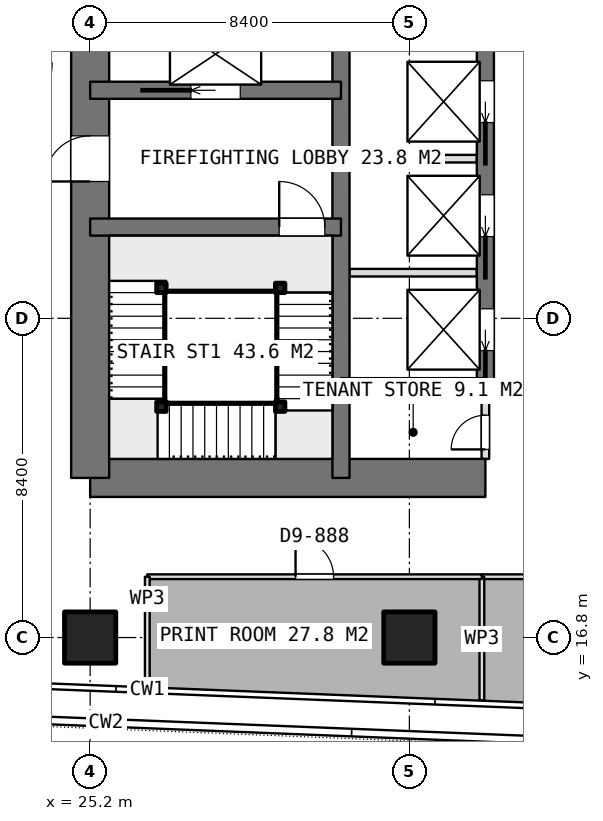
"""IFC4 building model, lengths in metres.
Left out: names, types, materials, properties, quantities, classifications, styles, units other than length and angle.
Written with IfcOpenShell. Run it as: python <this file> out.ifc"""

import sys

from ifc_helpers import new_model, si_unit, direction, frame, frame_2d, origin, origin_2d, place, context, subcontext, project, spatial, rectangle, extrude, element, fill, save


model = new_model("IFC4")
c1 = context("Model", 3, precision=1e-05, world=origin(), true_north=direction((0.0, 1.0)))
c2 = subcontext(c1, "Body", "Model", "MODEL_VIEW")
j1 = project(units=[si_unit("LENGTHUNIT", "METRE"), si_unit("PLANEANGLEUNIT", "RADIAN")], contexts=[c1])
p1 = place(None, origin())
s1 = spatial("IfcSite", under=j1, at=p1, CompositionType="ELEMENT")
p2 = place(p1, origin())
s2 = spatial("IfcBuilding", under=s1, at=p2, CompositionType="ELEMENT")
p3 = place(p2, frame((0.0, 0.0, 225.2)))
s3 = spatial("IfcBuildingStorey", under=s2, at=p3, CompositionType="ELEMENT", Elevation=225.2)
p4 = place(p3, frame((25.2, 21.0, 0.0), z_axis=(0.0, 0.0, 1.0), x_axis=(1.0, 0.0, 0.0)))
e1 = element("IfcWall", 1, at=p4, inside=s3, PredefinedType="SHEAR", context=c2, shape_type="SweptSolid", body=[
    extrude(rectangle(XDim=10.4, YDim=1.0, at=frame_2d((5.2, 0.0))), origin(), (0.0, 0.0, 1.0), 3.75),
])
p5 = place(p3, frame((25.2, 21.0, 0.0), z_axis=(0.0, 0.0, 1.0), x_axis=(0.0, 1.0, 0.0)))
e2 = element("IfcWall", 2, at=p5, inside=s3, PredefinedType="SHEAR", context=c2, shape_type="SweptSolid", body=[
    extrude(rectangle(XDim=25.2, YDim=1.0, at=frame_2d((12.6, 0.0))), origin(), (0.0, 0.0, 1.0), 3.75),
])
p6 = place(p5, frame((7.8, 0.0, 0.0)))
e3 = element("IfcOpeningElement", 3, at=p6, cuts=e2, PredefinedType="OPENING", context=c2, shape_type="SweptSolid", body=[
    extrude(rectangle(XDim=1.2, YDim=2.1, at=frame_2d((0.6, 1.05))), frame((0.0, 0.51, 0.0), z_axis=(0.0, -1.0, 0.0), x_axis=(1.0, 0.0, 0.0)), (0.0, 0.0, 1.0), 1.02),
])
p7 = place(p5, frame((14.25, 0.0, 0.0)))
e4 = element("IfcOpeningElement", 4, at=p7, cuts=e2, PredefinedType="OPENING", context=c2, shape_type="SweptSolid", body=[
    extrude(rectangle(XDim=0.9, YDim=2.1, at=frame_2d((0.45, 1.05))), frame((0.0, 0.51, 0.0), z_axis=(0.0, -1.0, 0.0), x_axis=(1.0, 0.0, 0.0)), (0.0, 0.0, 1.0), 1.02),
])
p8 = place(p5, frame((16.85, 0.0, 0.0)))
e5 = element("IfcOpeningElement", 5, at=p8, cuts=e2, PredefinedType="OPENING", context=c2, shape_type="SweptSolid", body=[
    extrude(rectangle(XDim=0.9, YDim=2.1, at=frame_2d((0.45, 1.05))), frame((0.0, 0.51, 0.0), z_axis=(0.0, -1.0, 0.0), x_axis=(1.0, 0.0, 0.0)), (0.0, 0.0, 1.0), 1.02),
])
p9 = place(p5, frame((19.025, 0.0, 0.0)))
e6 = element("IfcOpeningElement", 6, at=p9, cuts=e2, PredefinedType="OPENING", context=c2, shape_type="SweptSolid", body=[
    extrude(rectangle(XDim=1.2, YDim=2.1, at=frame_2d((0.6, 1.05))), frame((0.0, 0.51, 0.0), z_axis=(0.0, -1.0, 0.0), x_axis=(1.0, 0.0, 0.0)), (0.0, 0.0, 1.0), 1.02),
])
p10 = place(p3, frame((31.8, 21.0, 0.0), z_axis=(0.0, 0.0, 1.0), x_axis=(0.0, 1.0, 0.0)))
e7 = element("IfcWall", 7, at=p10, inside=s3, PredefinedType="SHEAR", context=c2, shape_type="SweptSolid", body=[
    extrude(rectangle(XDim=25.2, YDim=0.45, at=frame_2d((12.6, 0.0))), origin(), (0.0, 0.0, 1.0), 3.75),
])
p11 = place(p3, frame((35.6, 23.4, 0.0), z_axis=(0.0, 0.0, 1.0), x_axis=(0.0, 1.0, 0.0)))
e8 = element("IfcWall", 8, at=p11, inside=s3, PredefinedType="SHEAR", context=c2, shape_type="SweptSolid", body=[
    extrude(rectangle(XDim=18.0, YDim=0.45, at=frame_2d((9.0, 0.0))), origin(), (0.0, 0.0, 1.0), 3.75),
])
p12 = place(p11, frame((0.95, 0.0, 0.0)))
e9 = element("IfcOpeningElement", 9, at=p12, cuts=e8, PredefinedType="OPENING", context=c2, shape_type="SweptSolid", body=[
    extrude(rectangle(XDim=1.1, YDim=2.1, at=frame_2d((0.55, 1.05))), frame((0.0, 0.235, 0.0), z_axis=(0.0, -1.0, 0.0), x_axis=(1.0, 0.0, 0.0)), (0.0, 0.0, 1.0), 0.47),
])
p13 = place(p11, frame((3.95, 0.0, 0.0)))
e10 = element("IfcOpeningElement", 10, at=p13, cuts=e8, PredefinedType="OPENING", context=c2, shape_type="SweptSolid", body=[
    extrude(rectangle(XDim=1.1, YDim=2.1, at=frame_2d((0.55, 1.05))), frame((0.0, 0.235, 0.0), z_axis=(0.0, -1.0, 0.0), x_axis=(1.0, 0.0, 0.0)), (0.0, 0.0, 1.0), 0.47),
])
p14 = place(p11, frame((6.95, 0.0, 0.0)))
e11 = element("IfcOpeningElement", 11, at=p14, cuts=e8, PredefinedType="OPENING", context=c2, shape_type="SweptSolid", body=[
    extrude(rectangle(XDim=1.1, YDim=2.1, at=frame_2d((0.55, 1.05))), frame((0.0, 0.235, 0.0), z_axis=(0.0, -1.0, 0.0), x_axis=(1.0, 0.0, 0.0)), (0.0, 0.0, 1.0), 0.47),
])
p15 = place(p11, frame((9.95, 0.0, 0.0)))
e12 = element("IfcOpeningElement", 12, at=p15, cuts=e8, PredefinedType="OPENING", context=c2, shape_type="SweptSolid", body=[
    extrude(rectangle(XDim=1.1, YDim=2.1, at=frame_2d((0.55, 1.05))), frame((0.0, 0.235, 0.0), z_axis=(0.0, -1.0, 0.0), x_axis=(1.0, 0.0, 0.0)), (0.0, 0.0, 1.0), 0.47),
])
p16 = place(p11, frame((12.95, 0.0, 0.0)))
e13 = element("IfcOpeningElement", 13, at=p16, cuts=e8, PredefinedType="OPENING", context=c2, shape_type="SweptSolid", body=[
    extrude(rectangle(XDim=1.1, YDim=2.1, at=frame_2d((0.55, 1.05))), frame((0.0, 0.235, 0.0), z_axis=(0.0, -1.0, 0.0), x_axis=(1.0, 0.0, 0.0)), (0.0, 0.0, 1.0), 0.47),
])
p17 = place(p11, frame((15.95, 0.0, 0.0)))
e14 = element("IfcOpeningElement", 14, at=p17, cuts=e8, PredefinedType="OPENING", context=c2, shape_type="SweptSolid", body=[
    extrude(rectangle(XDim=1.1, YDim=2.1, at=frame_2d((0.55, 1.05))), frame((0.0, 0.235, 0.0), z_axis=(0.0, -1.0, 0.0), x_axis=(1.0, 0.0, 0.0)), (0.0, 0.0, 1.0), 0.47),
])
p18 = place(p3, frame((31.8, 23.4, 0.0), z_axis=(0.0, 0.0, 1.0), x_axis=(1.0, 0.0, 0.0)))
e15 = element("IfcWall", 15, at=p18, inside=s3, PredefinedType="SHEAR", context=c2, shape_type="SweptSolid", body=[
    extrude(rectangle(XDim=3.8, YDim=0.45, at=frame_2d((1.9, 0.0))), origin(), (0.0, 0.0, 1.0), 3.75),
])
p19 = place(p3, frame((25.2, 27.6, 0.0), z_axis=(0.0, 0.0, 1.0), x_axis=(1.0, 0.0, 0.0)))
e16 = element("IfcWall", 16, at=p19, inside=s3, PredefinedType="SHEAR", context=c2, shape_type="SweptSolid", body=[
    extrude(rectangle(XDim=6.6, YDim=0.45, at=frame_2d((3.3, 0.0))), origin(), (0.0, 0.0, 1.0), 3.75),
])
p20 = place(p19, frame((4.975, 0.0, 0.0)))
e17 = element("IfcOpeningElement", 17, at=p20, cuts=e16, PredefinedType="OPENING", context=c2, shape_type="SweptSolid", body=[
    extrude(rectangle(XDim=1.2, YDim=2.1, at=frame_2d((0.6, 1.05))), frame((0.0, 0.235, 0.0), z_axis=(0.0, -1.0, 0.0), x_axis=(1.0, 0.0, 0.0)), (0.0, 0.0, 1.0), 0.47),
])
p21 = place(p3, frame((25.2, 31.2, 0.0), z_axis=(0.0, 0.0, 1.0), x_axis=(1.0, 0.0, 0.0)))
e18 = element("IfcWall", 18, at=p21, inside=s3, PredefinedType="SHEAR", context=c2, shape_type="SweptSolid", body=[
    extrude(rectangle(XDim=6.6, YDim=0.45, at=frame_2d((3.3, 0.0))), origin(), (0.0, 0.0, 1.0), 3.75),
])
p22 = place(p21, frame((2.65, 0.0, 0.0)))
e19 = element("IfcOpeningElement", 19, at=p22, cuts=e18, PredefinedType="OPENING", context=c2, shape_type="SweptSolid", body=[
    extrude(rectangle(XDim=1.3, YDim=2.1, at=frame_2d((0.65, 1.05))), frame((0.0, 0.235, 0.0), z_axis=(0.0, -1.0, 0.0), x_axis=(1.0, 0.0, 0.0)), (0.0, 0.0, 1.0), 0.47),
])
for number, where, z_axis, x_axis in (
    (20, (25.2, 16.8, 0.0), (0.0, 0.0, 1.0), (1.0, 0.0, 0.0)),
    (21, (33.6, 16.8, 0.0), (0.0, 0.0, 1.0), (1.0, 0.0, 0.0)),
):
    element("IfcColumn", number, at=place(p3, frame(where, z_axis=z_axis, x_axis=x_axis)), inside=s3, PredefinedType="COLUMN", context=c2, shape_type="SweptSolid", body=[
        extrude(rectangle(XDim=1.35, YDim=1.35, at=origin_2d()), origin(), (0.0, 0.0, 1.0), 3.75),
    ])
for number, where, z_axis, x_axis in (
    (22, (32.025, 26.4, 0.0), (0.0, 0.0, 1.0), (1.0, 0.0, 0.0)),
    (23, (32.025, 29.4, 0.0), (0.0, 0.0, 1.0), (1.0, 0.0, 0.0)),
):
    element("IfcWall", number, at=place(p3, frame(where, z_axis=z_axis, x_axis=x_axis)), inside=s3, PredefinedType="PARTITIONING", context=c2, shape_type="SweptSolid", body=[
        extrude(rectangle(XDim=3.35, YDim=0.2, at=frame_2d((1.675, 0.0))), origin(), (0.0, 0.0, 1.0), 3.5),
    ])
p23 = place(p3, frame((35.6, 21.5, 0.0), z_axis=(0.0, 0.0, 1.0), x_axis=(0.0, 1.0, 0.0)))
e24 = element("IfcWall", 24, at=p23, inside=s3, PredefinedType="PARTITIONING", context=c2, shape_type="SweptSolid", body=[
    extrude(rectangle(XDim=1.675, YDim=0.2, at=frame_2d((0.837, 0.0))), origin(), (0.0, 0.0, 1.0), 3.5),
])
p24 = place(p23, frame((0.25, 0.0, 0.0)))
e25 = element("IfcOpeningElement", 25, at=p24, cuts=e24, PredefinedType="OPENING", context=c2, shape_type="SweptSolid", body=[
    extrude(rectangle(XDim=0.9, YDim=2.1, at=frame_2d((0.45, 1.05))), frame((0.0, 0.11, 0.0), z_axis=(0.0, -1.0, 0.0), x_axis=(1.0, 0.0, 0.0)), (0.0, 0.0, 1.0), 0.22),
])
p25 = place(p3, frame((35.508, 18.4, 0.0), z_axis=(0.0, 0.0, 1.0), x_axis=(1.0, 0.0, 0.0)))
e26 = element("IfcWall", 26, at=p25, inside=s3, PredefinedType="PARTITIONING", context=c2, shape_type="SweptSolid", body=[
    extrude(rectangle(XDim=15.875, YDim=0.125, at=frame_2d((7.938, 0.0))), origin(), (0.0, 0.0, 1.0), 3.5),
])
p26 = place(p25, frame((7.237, 0.0, 0.0)))
e27 = element("IfcOpeningElement", 27, at=p26, cuts=e26, PredefinedType="OPENING", context=c2, shape_type="SweptSolid", body=[
    extrude(rectangle(XDim=1.8, YDim=2.1, at=frame_2d((0.9, 1.05))), frame((0.0, 0.073, 0.0), z_axis=(0.0, -1.0, 0.0), x_axis=(1.0, 0.0, 0.0)), (0.0, 0.0, 1.0), 0.145),
])
p27 = place(p3, frame((35.508, 15.143, 0.0), z_axis=(0.0, 0.0, 1.0), x_axis=(0.0, 1.0, 0.0)))
e28 = element("IfcWall", 28, at=p27, inside=s3, PredefinedType="PARTITIONING", context=c2, shape_type="SweptSolid", body=[
    extrude(rectangle(XDim=3.257, YDim=0.125, at=frame_2d((1.628, 0.0))), origin(), (0.0, 0.0, 1.0), 3.5),
])
p28 = place(p3, frame((26.704, 18.4, 0.0), z_axis=(0.0, 0.0, 1.0), x_axis=(1.0, 0.0, 0.0)))
e29 = element("IfcWall", 29, at=p28, inside=s3, PredefinedType="PARTITIONING", context=c2, shape_type="SweptSolid", body=[
    extrude(rectangle(XDim=8.803, YDim=0.125, at=frame_2d((4.401, 0.0))), origin(), (0.0, 0.0, 1.0), 3.5),
])
p29 = place(p28, frame((3.901, 0.0, 0.0)))
e30 = element("IfcOpeningElement", 30, at=p29, cuts=e29, PredefinedType="OPENING", context=c2, shape_type="SweptSolid", body=[
    extrude(rectangle(XDim=1.0, YDim=2.1, at=frame_2d((0.5, 1.05))), frame((0.0, 0.073, 0.0), z_axis=(0.0, -1.0, 0.0), x_axis=(1.0, 0.0, 0.0)), (0.0, 0.0, 1.0), 0.145),
])
p30 = place(p3, frame((26.704, 15.495, 0.0), z_axis=(0.0, 0.0, 1.0), x_axis=(0.0, 1.0, 0.0)))
e31 = element("IfcWall", 31, at=p30, inside=s3, PredefinedType="PARTITIONING", context=c2, shape_type="SweptSolid", body=[
    extrude(rectangle(XDim=2.905, YDim=0.125, at=frame_2d((1.452, 0.0))), origin(), (0.0, 0.0, 1.0), 3.5),
])
for number, where, z_axis, x_axis in (
    (32, (30.2, 26.0, 0.0), (0.0, 0.0, 1.0), (1.0, 0.0, 0.0)),
    (33, (30.2, 22.875, 0.0), (0.0, 0.0, 1.0), (1.0, 0.0, 0.0)),
    (34, (27.075, 22.875, 0.0), (0.0, 0.0, 1.0), (1.0, 0.0, 0.0)),
    (35, (27.075, 26.0, 0.0), (0.0, 0.0, 1.0), (1.0, 0.0, 0.0)),
):
    element("IfcColumn", number, at=place(p3, frame(where, z_axis=z_axis, x_axis=x_axis)), inside=s3, PredefinedType="COLUMN", context=c2, shape_type="SweptSolid", body=[
        extrude(rectangle(XDim=0.25, YDim=0.25, at=origin_2d()), origin(), (0.0, 0.0, 1.0), 3.75),
    ])
p31 = place(p6, origin())
e36 = element("IfcDoor", 36, at=p31, inside=s3, OperationType="SINGLE_SWING_LEFT", PredefinedType="DOOR", context=c2, shape_type="SweptSolid", body=[
    extrude(rectangle(XDim=1.2, YDim=2.1, at=frame_2d((0.6, 1.05))), frame((0.0, 0.025, 0.0), z_axis=(0.0, -1.0, 0.0), x_axis=(1.0, 0.0, 0.0)), (0.0, 0.0, 1.0), 0.05),
])
fill(e3, e36)
p32 = place(p24, origin())
e37 = element("IfcDoor", 37, at=p32, inside=s3, OperationType="SINGLE_SWING_LEFT", PredefinedType="DOOR", context=c2, shape_type="SweptSolid", body=[
    extrude(rectangle(XDim=0.9, YDim=2.1, at=frame_2d((0.45, 1.05))), frame((0.0, 0.025, 0.0), z_axis=(0.0, -1.0, 0.0), x_axis=(1.0, 0.0, 0.0)), (0.0, 0.0, 1.0), 0.05),
])
fill(e25, e37)
p33 = place(p12, origin())
e38 = element("IfcDoor", 38, at=p33, inside=s3, OperationType="SLIDING_TO_LEFT", PredefinedType="USERDEFINED", context=c2, shape_type="SweptSolid", body=[
    extrude(rectangle(XDim=1.1, YDim=2.1, at=frame_2d((0.55, 1.05))), frame((0.0, 0.025, 0.0), z_axis=(0.0, -1.0, 0.0), x_axis=(1.0, 0.0, 0.0)), (0.0, 0.0, 1.0), 0.05),
])
fill(e9, e38)
p34 = place(p13, origin())
e39 = element("IfcDoor", 39, at=p34, inside=s3, OperationType="SLIDING_TO_LEFT", PredefinedType="USERDEFINED", context=c2, shape_type="SweptSolid", body=[
    extrude(rectangle(XDim=1.1, YDim=2.1, at=frame_2d((0.55, 1.05))), frame((0.0, 0.025, 0.0), z_axis=(0.0, -1.0, 0.0), x_axis=(1.0, 0.0, 0.0)), (0.0, 0.0, 1.0), 0.05),
])
fill(e10, e39)
p35 = place(p14, origin())
e40 = element("IfcDoor", 40, at=p35, inside=s3, OperationType="SLIDING_TO_LEFT", PredefinedType="USERDEFINED", context=c2, shape_type="SweptSolid", body=[
    extrude(rectangle(XDim=1.1, YDim=2.1, at=frame_2d((0.55, 1.05))), frame((0.0, 0.025, 0.0), z_axis=(0.0, -1.0, 0.0), x_axis=(1.0, 0.0, 0.0)), (0.0, 0.0, 1.0), 0.05),
])
fill(e11, e40)
p36 = place(p22, origin())
e41 = element("IfcDoor", 41, at=p36, inside=s3, OperationType="SLIDING_TO_LEFT", PredefinedType="USERDEFINED", context=c2, shape_type="SweptSolid", body=[
    extrude(rectangle(XDim=1.3, YDim=2.1, at=frame_2d((0.65, 1.05))), frame((0.0, 0.025, 0.0), z_axis=(0.0, -1.0, 0.0), x_axis=(1.0, 0.0, 0.0)), (0.0, 0.0, 1.0), 0.05),
])
fill(e19, e41)
p37 = place(p29, origin())
e42 = element("IfcDoor", 42, at=p37, inside=s3, OperationType="SINGLE_SWING_LEFT", PredefinedType="DOOR", context=c2, shape_type="SweptSolid", body=[
    extrude(rectangle(XDim=1.0, YDim=2.1, at=frame_2d((0.5, 1.05))), frame((0.0, 0.025, 0.0), z_axis=(0.0, -1.0, 0.0), x_axis=(1.0, 0.0, 0.0)), (0.0, 0.0, 1.0), 0.05),
])
fill(e30, e42)
p38 = place(p20, origin())
e43 = element("IfcDoor", 43, at=p38, inside=s3, OperationType="SINGLE_SWING_RIGHT", PredefinedType="DOOR", context=c2, shape_type="SweptSolid", body=[
    extrude(rectangle(XDim=1.2, YDim=2.1, at=frame_2d((0.6, 1.05))), frame((0.0, 0.025, 0.0), z_axis=(0.0, -1.0, 0.0), x_axis=(1.0, 0.0, 0.0)), (0.0, 0.0, 1.0), 0.05),
])
fill(e17, e43)
save(model, sys.argv[1])
